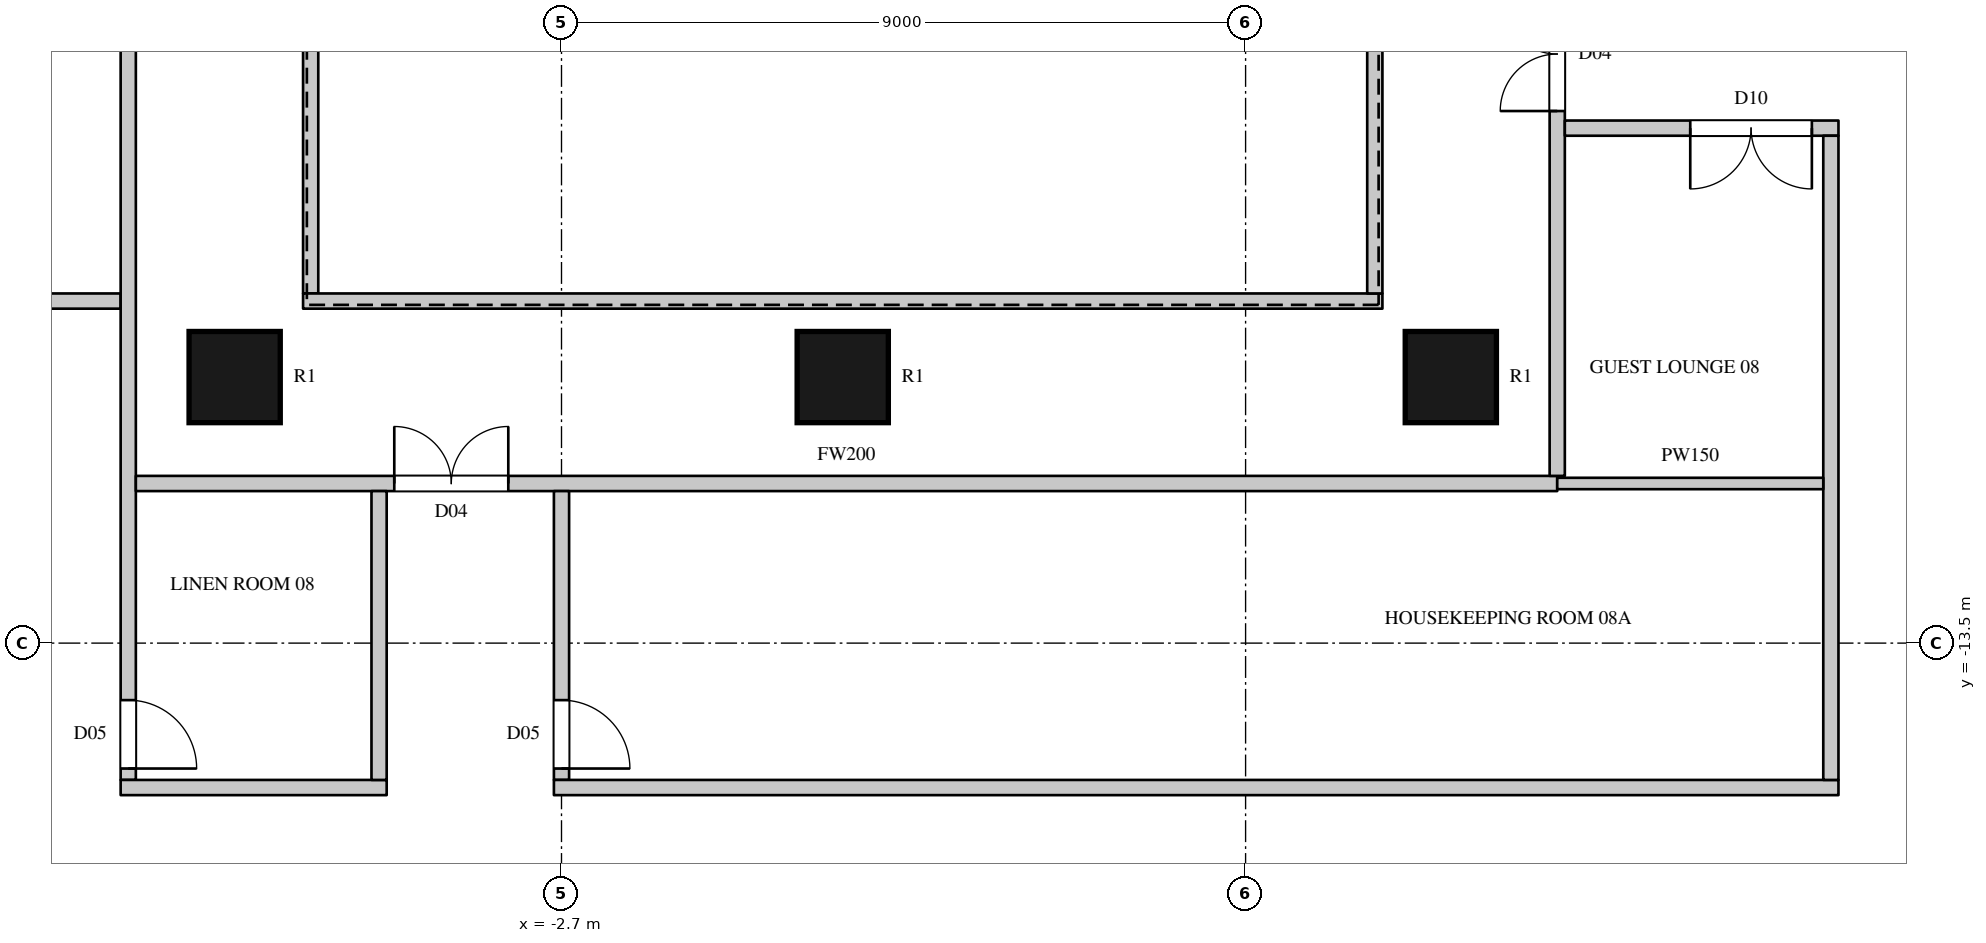
"""IFC4 building model, lengths in metres.
Left out: names, types, materials, properties, quantities, classifications, styles, units other than length and angle.
Written with IfcOpenShell. Run it as: python <this file> out.ifc"""

import sys

from ifc_helpers import new_model, si_unit, direction, frame, frame_2d, origin, origin_2d, place, context, subcontext, project, spatial, rectangle, circle, extrude, element, fill, save


model = new_model("IFC4")
c1 = context("Model", 3, precision=1e-05, world=origin(), true_north=direction((0.0, 1.0)))
c2 = subcontext(c1, "Body", "Model", "MODEL_VIEW")
j1 = project(units=[si_unit("LENGTHUNIT", "METRE"), si_unit("PLANEANGLEUNIT", "RADIAN")], contexts=[c1])
p1 = place(None, origin())
s1 = spatial("IfcSite", under=j1, at=p1, CompositionType="ELEMENT")
p2 = place(p1, origin())
s2 = spatial("IfcBuilding", under=s1, at=p2, CompositionType="ELEMENT")
p3 = place(p2, frame((0.0, 0.0, 59.1)))
s3 = spatial("IfcBuildingStorey", under=s2, at=p3, CompositionType="ELEMENT", Elevation=59.1)
for number, where, z_axis, x_axis in (
    (1, (-7.0, -10.0, 0.0), (0.0, 0.0, 1.0), (1.0, 0.0, 0.0)),
    (2, (1.0, -10.0, 0.0), (0.0, 0.0, 1.0), (1.0, 0.0, 0.0)),
    (3, (9.0, -10.0, 0.0), (0.0, 0.0, 1.0), (1.0, 0.0, 0.0)),
):
    element("IfcColumn", number, at=place(p3, frame(where, z_axis=z_axis, x_axis=x_axis)), inside=s3, PredefinedType="COLUMN", context=c2, shape_type="SweptSolid", body=[
        extrude(circle(Radius=0.6, at=origin_2d()), origin(), (0.0, 0.0, 1.0), 3.6),
    ])
p4 = place(p3, frame((-13.97, -9.0, 0.0), z_axis=(0.0, 0.0, 1.0), x_axis=(1.0, 0.0, 0.0)))
e4 = element("IfcWall", 4, at=p4, inside=s3, PredefinedType="PARTITIONING", context=c2, shape_type="SweptSolid", body=[
    extrude(rectangle(XDim=5.47, YDim=0.2, at=frame_2d((2.735, 0.0))), origin(), (0.0, 0.0, 1.0), 3.3),
])
p5 = place(p4, frame((0.4, 0.0, 0.0)))
e5 = element("IfcOpeningElement", 5, at=p5, cuts=e4, PredefinedType="OPENING", context=c2, shape_type="SweptSolid", body=[
    extrude(rectangle(XDim=1.5, YDim=2.2, at=frame_2d((0.75, 1.1))), frame((0.0, 0.11, 0.0), z_axis=(0.0, -1.0, 0.0), x_axis=(1.0, 0.0, 0.0)), (0.0, 0.0, 1.0), 0.22),
])
p6 = place(p4, frame((2.05, 0.0, 0.0)))
e6 = element("IfcOpeningElement", 6, at=p6, cuts=e4, PredefinedType="OPENING", context=c2, shape_type="SweptSolid", body=[
    extrude(rectangle(XDim=1.5, YDim=2.2, at=frame_2d((0.75, 1.1))), frame((0.0, 0.11, 0.0), z_axis=(0.0, -1.0, 0.0), x_axis=(1.0, 0.0, 0.0)), (0.0, 0.0, 1.0), 0.22),
])
p7 = place(p3, frame((-8.4, -15.3, 0.0), z_axis=(0.0, 0.0, 1.0), x_axis=(0.0, 1.0, 0.0)))
e7 = element("IfcWall", 7, at=p7, inside=s3, PredefinedType="PARTITIONING", context=c2, shape_type="SweptSolid", body=[
    extrude(rectangle(XDim=30.6, YDim=0.2, at=frame_2d((15.3, 0.0))), origin(), (0.0, 0.0, 1.0), 3.3),
])
p8 = place(p7, frame((19.05, 0.0, 0.0)))
e8 = element("IfcOpeningElement", 8, at=p8, cuts=e7, PredefinedType="OPENING", context=c2, shape_type="SweptSolid", body=[
    extrude(rectangle(XDim=1.5, YDim=2.2, at=frame_2d((0.75, 1.1))), frame((0.0, 0.11, 0.0), z_axis=(0.0, -1.0, 0.0), x_axis=(1.0, 0.0, 0.0)), (0.0, 0.0, 1.0), 0.22),
])
p9 = place(p7, frame((29.55, 0.0, 0.0)))
e9 = element("IfcOpeningElement", 9, at=p9, cuts=e7, PredefinedType="OPENING", context=c2, shape_type="SweptSolid", body=[
    extrude(rectangle(XDim=0.9, YDim=2.2, at=frame_2d((0.45, 1.1))), frame((0.0, 0.11, 0.0), z_axis=(0.0, -1.0, 0.0), x_axis=(1.0, 0.0, 0.0)), (0.0, 0.0, 1.0), 0.22),
])
p10 = place(p7, frame((0.15, 0.0, 0.0)))
e10 = element("IfcOpeningElement", 10, at=p10, cuts=e7, PredefinedType="OPENING", context=c2, shape_type="SweptSolid", body=[
    extrude(rectangle(XDim=0.9, YDim=2.2, at=frame_2d((0.45, 1.1))), frame((0.0, 0.11, 0.0), z_axis=(0.0, -1.0, 0.0), x_axis=(1.0, 0.0, 0.0)), (0.0, 0.0, 1.0), 0.22),
])
p11 = place(p3, frame((-8.5, -15.4, 0.0), z_axis=(0.0, 0.0, 1.0), x_axis=(1.0, 0.0, 0.0)))
e11 = element("IfcWall", 11, at=p11, inside=s3, PredefinedType="PARTITIONING", context=c2, shape_type="SweptSolid", body=[
    extrude(rectangle(XDim=3.5, YDim=0.2, at=frame_2d((1.75, 0.0))), origin(), (0.0, 0.0, 1.0), 3.3),
])
p12 = place(p3, frame((-8.3, -11.4, 0.0), z_axis=(0.0, 0.0, 1.0), x_axis=(1.0, 0.0, 0.0)))
e12 = element("IfcWall", 12, at=p12, inside=s3, PredefinedType="PARTITIONING", context=c2, shape_type="SweptSolid", body=[
    extrude(rectangle(XDim=18.7, YDim=0.2, at=frame_2d((9.35, 0.0))), origin(), (0.0, 0.0, 1.0), 3.3),
])
p13 = place(p12, frame((3.4, 0.0, 0.0)))
e13 = element("IfcOpeningElement", 13, at=p13, cuts=e12, PredefinedType="OPENING", context=c2, shape_type="SweptSolid", body=[
    extrude(rectangle(XDim=1.5, YDim=2.2, at=frame_2d((0.75, 1.1))), frame((0.0, 0.11, 0.0), z_axis=(0.0, -1.0, 0.0), x_axis=(1.0, 0.0, 0.0)), (0.0, 0.0, 1.0), 0.22),
])
p14 = place(p3, frame((-6.0, -8.9, 0.0), z_axis=(0.0, 0.0, 1.0), x_axis=(0.0, 1.0, 0.0)))
e14 = element("IfcWall", 14, at=p14, inside=s3, PredefinedType="PARTITIONING", context=c2, shape_type="SweptSolid", body=[
    extrude(rectangle(XDim=17.8, YDim=0.2, at=frame_2d((8.9, 0.0))), origin(), (0.0, 0.0, 1.0), 3.3),
])
p15 = place(p3, frame((-6.1, -9.0, 0.0), z_axis=(0.0, 0.0, 1.0), x_axis=(1.0, 0.0, 0.0)))
e15 = element("IfcWall", 15, at=p15, inside=s3, PredefinedType="PARTITIONING", context=c2, shape_type="SweptSolid", body=[
    extrude(rectangle(XDim=14.2, YDim=0.2, at=frame_2d((7.1, 0.0))), origin(), (0.0, 0.0, 1.0), 3.3),
])
p16 = place(p3, frame((-5.1, -15.3, 0.0), z_axis=(0.0, 0.0, 1.0), x_axis=(0.0, 1.0, 0.0)))
e16 = element("IfcWall", 16, at=p16, inside=s3, PredefinedType="PARTITIONING", context=c2, shape_type="SweptSolid", body=[
    extrude(rectangle(XDim=3.8, YDim=0.2, at=frame_2d((1.9, 0.0))), origin(), (0.0, 0.0, 1.0), 3.3),
])
p17 = place(p3, frame((-2.7, -15.3, 0.0), z_axis=(0.0, 0.0, 1.0), x_axis=(0.0, 1.0, 0.0)))
e17 = element("IfcWall", 17, at=p17, inside=s3, PredefinedType="PARTITIONING", context=c2, shape_type="SweptSolid", body=[
    extrude(rectangle(XDim=3.8, YDim=0.2, at=frame_2d((1.9, 0.0))), origin(), (0.0, 0.0, 1.0), 2.75),
])
p18 = place(p17, frame((0.15, 0.0, 0.0)))
e18 = element("IfcOpeningElement", 18, at=p18, cuts=e17, PredefinedType="OPENING", context=c2, shape_type="SweptSolid", body=[
    extrude(rectangle(XDim=0.9, YDim=2.2, at=frame_2d((0.45, 1.1))), frame((0.0, 0.11, 0.0), z_axis=(0.0, -1.0, 0.0), x_axis=(1.0, 0.0, 0.0)), (0.0, 0.0, 1.0), 0.22),
])
p19 = place(p3, frame((-2.8, -15.4, 0.0), z_axis=(0.0, 0.0, 1.0), x_axis=(1.0, 0.0, 0.0)))
e19 = element("IfcWall", 19, at=p19, inside=s3, PredefinedType="PARTITIONING", context=c2, shape_type="SweptSolid", body=[
    extrude(rectangle(XDim=16.9, YDim=0.2, at=frame_2d((8.45, 0.0))), origin(), (0.0, 0.0, 1.0), 3.3),
])
p20 = place(p3, frame((8.0, -8.9, 0.0), z_axis=(0.0, 0.0, 1.0), x_axis=(0.0, 1.0, 0.0)))
e20 = element("IfcWall", 20, at=p20, inside=s3, PredefinedType="PARTITIONING", context=c2, shape_type="SweptSolid", body=[
    extrude(rectangle(XDim=17.8, YDim=0.2, at=frame_2d((8.9, 0.0))), origin(), (0.0, 0.0, 1.0), 3.3),
])
p21 = place(p3, frame((10.4, -11.3, 0.0), z_axis=(0.0, 0.0, 1.0), x_axis=(0.0, 1.0, 0.0)))
e21 = element("IfcWall", 21, at=p21, inside=s3, PredefinedType="PARTITIONING", context=c2, shape_type="SweptSolid", body=[
    extrude(rectangle(XDim=22.6, YDim=0.2, at=frame_2d((11.3, 0.0))), origin(), (0.0, 0.0, 1.0), 3.3),
])
p22 = place(p21, frame((4.8, 0.0, 0.0)))
e22 = element("IfcOpeningElement", 22, at=p22, cuts=e21, PredefinedType="OPENING", context=c2, shape_type="SweptSolid", body=[
    extrude(rectangle(XDim=1.5, YDim=2.2, at=frame_2d((0.75, 1.1))), frame((0.0, 0.11, 0.0), z_axis=(0.0, -1.0, 0.0), x_axis=(1.0, 0.0, 0.0)), (0.0, 0.0, 1.0), 0.22),
])
p23 = place(p21, frame((16.3, 0.0, 0.0)))
e23 = element("IfcOpeningElement", 23, at=p23, cuts=e21, PredefinedType="OPENING", context=c2, shape_type="SweptSolid", body=[
    extrude(rectangle(XDim=1.5, YDim=2.2, at=frame_2d((0.75, 1.1))), frame((0.0, 0.11, 0.0), z_axis=(0.0, -1.0, 0.0), x_axis=(1.0, 0.0, 0.0)), (0.0, 0.0, 1.0), 0.22),
])
p24 = place(p21, frame((11.95, 0.0, 0.0)))
e24 = element("IfcOpeningElement", 24, at=p24, cuts=e21, PredefinedType="OPENING", context=c2, shape_type="SweptSolid", body=[
    extrude(rectangle(XDim=1.5, YDim=2.2, at=frame_2d((0.75, 1.1))), frame((0.0, 0.11, 0.0), z_axis=(0.0, -1.0, 0.0), x_axis=(1.0, 0.0, 0.0)), (0.0, 0.0, 1.0), 0.22),
])
p25 = place(p3, frame((10.5, -6.725, 0.0), z_axis=(0.0, 0.0, 1.0), x_axis=(1.0, 0.0, 0.0)))
e25 = element("IfcWall", 25, at=p25, inside=s3, PredefinedType="PARTITIONING", context=c2, shape_type="SweptSolid", body=[
    extrude(rectangle(XDim=3.6, YDim=0.2, at=frame_2d((1.8, 0.0))), origin(), (0.0, 0.0, 1.0), 3.3),
])
p26 = place(p25, frame((1.65, 0.0, 0.0)))
e26 = element("IfcOpeningElement", 26, at=p26, cuts=e25, PredefinedType="OPENING", context=c2, shape_type="SweptSolid", body=[
    extrude(rectangle(XDim=1.6, YDim=2.4, at=frame_2d((0.8, 1.2))), frame((0.0, 0.11, 0.0), z_axis=(0.0, -1.0, 0.0), x_axis=(1.0, 0.0, 0.0)), (0.0, 0.0, 1.0), 0.22),
])
p27 = place(p3, frame((14.0, -15.3, 0.0), z_axis=(0.0, 0.0, 1.0), x_axis=(0.0, 1.0, 0.0)))
e27 = element("IfcWall", 27, at=p27, inside=s3, PredefinedType="PARTITIONING", context=c2, shape_type="SweptSolid", body=[
    extrude(rectangle(XDim=8.475, YDim=0.2, at=frame_2d((4.238, 0.0))), origin(), (0.0, 0.0, 1.0), 3.3),
])
p28 = place(p3, frame((10.4, -11.4, 0.0), z_axis=(0.0, 0.0, 1.0), x_axis=(1.0, 0.0, 0.0)))
e28 = element("IfcWall", 28, at=p28, inside=s3, PredefinedType="PARTITIONING", context=c2, shape_type="SweptSolid", body=[
    extrude(rectangle(XDim=3.5, YDim=0.15, at=frame_2d((1.75, 0.0))), origin(), (0.0, 0.0, 1.0), 3.3),
])
p29 = place(p13, origin())
e29 = element("IfcDoor", 29, at=p29, inside=s3, OperationType="DOUBLE_DOOR_SINGLE_SWING", PredefinedType="DOOR", context=c2, shape_type="SweptSolid", body=[
    extrude(rectangle(XDim=1.5, YDim=2.2, at=frame_2d((0.75, 1.1))), frame((0.0, 0.025, 0.0), z_axis=(0.0, -1.0, 0.0), x_axis=(1.0, 0.0, 0.0)), (0.0, 0.0, 1.0), 0.05),
])
fill(e13, e29)
p30 = place(p22, origin())
e30 = element("IfcDoor", 30, at=p30, inside=s3, OperationType="DOUBLE_DOOR_SINGLE_SWING", PredefinedType="DOOR", context=c2, shape_type="SweptSolid", body=[
    extrude(rectangle(XDim=1.5, YDim=2.2, at=frame_2d((0.75, 1.1))), frame((0.0, 0.025, 0.0), z_axis=(0.0, -1.0, 0.0), x_axis=(1.0, 0.0, 0.0)), (0.0, 0.0, 1.0), 0.05),
])
fill(e22, e30)
p31 = place(p10, origin())
e31 = element("IfcDoor", 31, at=p31, inside=s3, OperationType="SINGLE_SWING_RIGHT", PredefinedType="DOOR", context=c2, shape_type="SweptSolid", body=[
    extrude(rectangle(XDim=0.9, YDim=2.2, at=frame_2d((0.45, 1.1))), frame((0.0, 0.025, 0.0), z_axis=(0.0, -1.0, 0.0), x_axis=(1.0, 0.0, 0.0)), (0.0, 0.0, 1.0), 0.05),
])
fill(e10, e31)
p32 = place(p18, origin())
e32 = element("IfcDoor", 32, at=p32, inside=s3, OperationType="SINGLE_SWING_RIGHT", PredefinedType="DOOR", context=c2, shape_type="SweptSolid", body=[
    extrude(rectangle(XDim=0.9, YDim=2.2, at=frame_2d((0.45, 1.1))), frame((0.0, 0.025, 0.0), z_axis=(0.0, -1.0, 0.0), x_axis=(1.0, 0.0, 0.0)), (0.0, 0.0, 1.0), 0.05),
])
fill(e18, e32)
p33 = place(p26, origin())
e33 = element("IfcDoor", 33, at=p33, inside=s3, OperationType="DOUBLE_DOOR_SINGLE_SWING", PredefinedType="DOOR", context=c2, shape_type="SweptSolid", body=[
    extrude(rectangle(XDim=1.6, YDim=2.4, at=frame_2d((0.8, 1.2))), frame((0.0, 0.025, 0.0), z_axis=(0.0, -1.0, 0.0), x_axis=(1.0, 0.0, 0.0)), (0.0, 0.0, 1.0), 0.05),
])
fill(e26, e33)
save(model, sys.argv[1])
